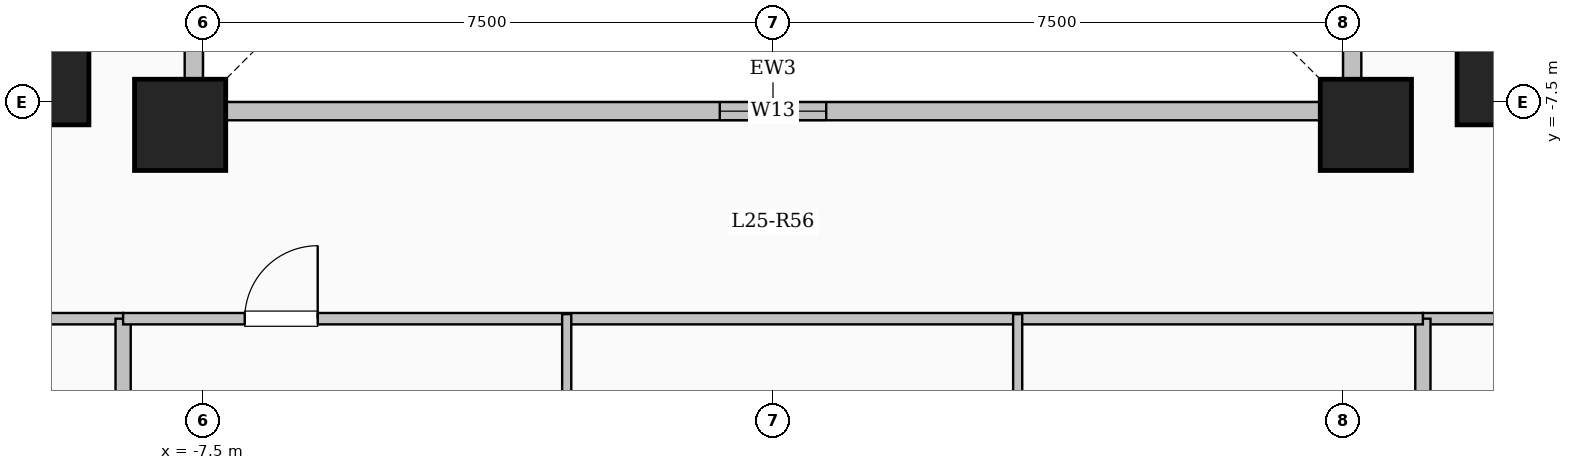
"""IFC4 building model, lengths in metres.
Left out: names, types, materials, properties, quantities, classifications, styles, units other than length and angle.
Written with IfcOpenShell. Run it as: python <this file> out.ifc"""

import sys

from ifc_helpers import new_model, si_unit, direction, frame, frame_2d, origin, origin_2d, place, context, subcontext, project, spatial, rectangle, extrude, element, fill, save


model = new_model("IFC4")
c1 = context("Model", 3, precision=1e-05, world=origin(), true_north=direction((0.0, 1.0)))
c2 = subcontext(c1, "Body", "Model", "MODEL_VIEW")
j1 = project(units=[si_unit("LENGTHUNIT", "METRE"), si_unit("PLANEANGLEUNIT", "RADIAN")], contexts=[c1])
p1 = place(None, origin())
s1 = spatial("IfcSite", under=j1, at=p1, CompositionType="ELEMENT")
p2 = place(p1, origin())
s2 = spatial("IfcBuilding", under=s1, at=p2, CompositionType="ELEMENT")
p3 = place(p2, frame((0.0, 0.0, 95.05)))
s3 = spatial("IfcBuildingStorey", under=s2, at=p3, CompositionType="ELEMENT", Elevation=95.05)
for number, where, z_axis, x_axis in (
    (1, (-7.8, -7.8, 0.0), (0.0, 0.0, 1.0), (1.0, 0.0, 0.0)),
    (2, (7.8, -7.8, 0.0), (0.0, 0.0, 1.0), (1.0, 0.0, 0.0)),
    (3, (-9.6, -7.2, 0.0), (0.0, 0.0, 1.0), (1.0, 0.0, 0.0)),
    (4, (9.6, -7.2, 0.0), (0.0, 0.0, 1.0), (1.0, 0.0, 0.0)),
):
    element("IfcColumn", number, at=place(p3, frame(where, z_axis=z_axis, x_axis=x_axis)), inside=s3, PredefinedType="COLUMN", context=c2, shape_type="SweptSolid", body=[
        extrude(rectangle(XDim=1.2, YDim=1.2, at=origin_2d()), origin(), (0.0, 0.0, 1.0), 3.35),
    ])
p4 = place(p3, frame((-7.62, -7.62, 0.0), z_axis=(0.0, 0.0, 1.0), x_axis=(1.0, 0.0, 0.0)))
e5 = element("IfcWall", 5, at=p4, inside=s3, PredefinedType="SOLIDWALL", context=c2, shape_type="SweptSolid", body=[
    extrude(rectangle(XDim=15.24, YDim=0.24, at=frame_2d((7.62, 0.0))), origin(), (0.0, 0.0, 1.0), 3.1),
])
p5 = place(p4, frame((6.92, 0.0, 0.95)))
e6 = element("IfcOpeningElement", 6, at=p5, cuts=e5, PredefinedType="OPENING", context=c2, shape_type="SweptSolid", body=[
    extrude(rectangle(XDim=1.4, YDim=1.5, at=frame_2d((0.7, 0.75))), frame((0.0, 0.13, 0.0), z_axis=(0.0, -1.0, 0.0), x_axis=(1.0, 0.0, 0.0)), (0.0, 0.0, 1.0), 0.26),
])
p6 = place(p3, frame((7.62, -7.62, 0.0), z_axis=(0.0, 0.0, 1.0), x_axis=(0.0, 1.0, 0.0)))
e7 = element("IfcWall", 7, at=p6, inside=s3, PredefinedType="SOLIDWALL", context=c2, shape_type="SweptSolid", body=[
    extrude(rectangle(XDim=15.24, YDim=0.24, at=frame_2d((7.62, 0.0))), origin(), (0.0, 0.0, 1.0), 3.1),
])
p7 = place(p6, frame((6.92, 0.0, 0.95)))
e8 = element("IfcOpeningElement", 8, at=p7, cuts=e7, PredefinedType="OPENING", context=c2, shape_type="SweptSolid", body=[
    extrude(rectangle(XDim=1.4, YDim=1.5, at=frame_2d((0.7, 0.75))), frame((0.0, 0.13, 0.0), z_axis=(0.0, -1.0, 0.0), x_axis=(1.0, 0.0, 0.0)), (0.0, 0.0, 1.0), 0.26),
])
p8 = place(p3, frame((-7.62, 7.62, 0.0), z_axis=(0.0, 0.0, 1.0), x_axis=(0.0, -1.0, 0.0)))
e9 = element("IfcWall", 9, at=p8, inside=s3, PredefinedType="SOLIDWALL", context=c2, shape_type="SweptSolid", body=[
    extrude(rectangle(XDim=15.24, YDim=0.24, at=frame_2d((7.62, 0.0))), origin(), (0.0, 0.0, 1.0), 3.1),
])
p9 = place(p8, frame((6.92, 0.0, 0.95)))
e10 = element("IfcOpeningElement", 10, at=p9, cuts=e9, PredefinedType="OPENING", context=c2, shape_type="SweptSolid", body=[
    extrude(rectangle(XDim=1.4, YDim=1.5, at=frame_2d((0.7, 0.75))), frame((0.0, 0.13, 0.0), z_axis=(0.0, -1.0, 0.0), x_axis=(1.0, 0.0, 0.0)), (0.0, 0.0, 1.0), 0.26),
])
p10 = place(p3, frame((-21.05, -10.35, 0.0), z_axis=(0.0, 0.0, 1.0), x_axis=(1.0, 0.0, 0.0)))
e11 = element("IfcWall", 11, at=p10, inside=s3, PredefinedType="PARTITIONING", context=c2, shape_type="SweptSolid", body=[
    extrude(rectangle(XDim=12.5, YDim=0.15, at=frame_2d((6.25, 0.0))), origin(), (0.0, 0.0, 1.0), 3.1),
])
p11 = place(p10, frame((1.736, 0.0, 0.0)))
e12 = element("IfcOpeningElement", 12, at=p11, cuts=e11, PredefinedType="OPENING", context=c2, shape_type="SweptSolid", body=[
    extrude(rectangle(XDim=0.95, YDim=2.15, at=frame_2d((0.475, 1.075))), frame((0.0, 0.085, 0.0), z_axis=(0.0, -1.0, 0.0), x_axis=(1.0, 0.0, 0.0)), (0.0, 0.0, 1.0), 0.17),
])
p12 = place(p10, frame((6.248, 0.0, 0.0)))
e13 = element("IfcOpeningElement", 13, at=p12, cuts=e11, PredefinedType="OPENING", context=c2, shape_type="SweptSolid", body=[
    extrude(rectangle(XDim=0.95, YDim=2.15, at=frame_2d((0.475, 1.075))), frame((0.0, 0.085, 0.0), z_axis=(0.0, -1.0, 0.0), x_axis=(1.0, 0.0, 0.0)), (0.0, 0.0, 1.0), 0.17),
])
p13 = place(p10, frame((10.262, 0.0, 0.0)))
e14 = element("IfcOpeningElement", 14, at=p13, cuts=e11, PredefinedType="OPENING", context=c2, shape_type="SweptSolid", body=[
    extrude(rectangle(XDim=0.95, YDim=2.15, at=frame_2d((0.475, 1.075))), frame((0.0, 0.085, 0.0), z_axis=(0.0, -1.0, 0.0), x_axis=(1.0, 0.0, 0.0)), (0.0, 0.0, 1.0), 0.17),
])
p14 = place(p3, frame((8.55, -10.35, 0.0), z_axis=(0.0, 0.0, 1.0), x_axis=(1.0, 0.0, 0.0)))
e15 = element("IfcWall", 15, at=p14, inside=s3, PredefinedType="PARTITIONING", context=c2, shape_type="SweptSolid", body=[
    extrude(rectangle(XDim=12.5, YDim=0.15, at=frame_2d((6.25, 0.0))), origin(), (0.0, 0.0, 1.0), 3.1),
])
p15 = place(p14, frame((1.786, 0.0, 0.0)))
e16 = element("IfcOpeningElement", 16, at=p15, cuts=e15, PredefinedType="OPENING", context=c2, shape_type="SweptSolid", body=[
    extrude(rectangle(XDim=0.95, YDim=2.15, at=frame_2d((0.475, 1.075))), frame((0.0, 0.085, 0.0), z_axis=(0.0, -1.0, 0.0), x_axis=(1.0, 0.0, 0.0)), (0.0, 0.0, 1.0), 0.17),
])
p16 = place(p14, frame((6.298, 0.0, 0.0)))
e17 = element("IfcOpeningElement", 17, at=p16, cuts=e15, PredefinedType="OPENING", context=c2, shape_type="SweptSolid", body=[
    extrude(rectangle(XDim=0.95, YDim=2.15, at=frame_2d((0.475, 1.075))), frame((0.0, 0.085, 0.0), z_axis=(0.0, -1.0, 0.0), x_axis=(1.0, 0.0, 0.0)), (0.0, 0.0, 1.0), 0.17),
])
p17 = place(p14, frame((10.312, 0.0, 0.0)))
e18 = element("IfcOpeningElement", 18, at=p17, cuts=e15, PredefinedType="OPENING", context=c2, shape_type="SweptSolid", body=[
    extrude(rectangle(XDim=0.95, YDim=2.15, at=frame_2d((0.475, 1.075))), frame((0.0, 0.085, 0.0), z_axis=(0.0, -1.0, 0.0), x_axis=(1.0, 0.0, 0.0)), (0.0, 0.0, 1.0), 0.17),
])
for number, where, z_axis, x_axis in (
    (19, (-8.55, -22.704, 0.0), (0.0, 0.0, 1.0), (0.0, 1.0, 0.0)),
    (20, (8.55, -22.704, 0.0), (0.0, 0.0, 1.0), (0.0, 1.0, 0.0)),
):
    element("IfcWall", number, at=place(p3, frame(where, z_axis=z_axis, x_axis=x_axis)), inside=s3, PredefinedType="SOLIDWALL", context=c2, shape_type="SweptSolid", body=[
        extrude(rectangle(XDim=12.354, YDim=0.2, at=frame_2d((6.177, 0.0))), origin(), (0.0, 0.0, 1.0), 3.1),
    ])
p18 = place(p3, frame((-8.55, -10.35, 0.0), z_axis=(0.0, 0.0, 1.0), x_axis=(1.0, 0.0, 0.0)))
e21 = element("IfcWall", 21, at=p18, inside=s3, PredefinedType="PARTITIONING", context=c2, shape_type="SweptSolid", body=[
    extrude(rectangle(XDim=17.1, YDim=0.15, at=frame_2d((8.55, 0.0))), origin(), (0.0, 0.0, 1.0), 3.1),
])
p19 = place(p18, frame((1.6, 0.0, 0.0)))
e22 = element("IfcOpeningElement", 22, at=p19, cuts=e21, PredefinedType="OPENING", context=c2, shape_type="SweptSolid", body=[
    extrude(rectangle(XDim=0.96, YDim=2.15, at=frame_2d((0.48, 1.075))), frame((0.0, 0.085, 0.0), z_axis=(0.0, -1.0, 0.0), x_axis=(1.0, 0.0, 0.0)), (0.0, 0.0, 1.0), 0.17),
])
p20 = place(p3, frame((-2.714, -23.58, 0.0), z_axis=(0.0, 0.0, 1.0), x_axis=(0.0, 1.0, 0.0)))
e23 = element("IfcWall", 23, at=p20, inside=s3, PredefinedType="PARTITIONING", context=c2, shape_type="SweptSolid", body=[
    extrude(rectangle(XDim=13.29, YDim=0.12, at=frame_2d((6.645, 0.0))), origin(), (0.0, 0.0, 1.0), 3.1),
])
p21 = place(p20, frame((9.465, 0.0, 0.0)))
e24 = element("IfcOpeningElement", 24, at=p21, cuts=e23, PredefinedType="OPENING", context=c2, shape_type="SweptSolid", body=[
    extrude(rectangle(XDim=1.08, YDim=2.15, at=frame_2d((0.54, 1.075))), frame((0.0, 0.07, 0.0), z_axis=(0.0, -1.0, 0.0), x_axis=(1.0, 0.0, 0.0)), (0.0, 0.0, 1.0), 0.14),
])
p22 = place(p3, frame((3.219, -12.75, 0.0), z_axis=(0.0, 0.0, 1.0), x_axis=(0.0, 1.0, 0.0)))
e25 = element("IfcWall", 25, at=p22, inside=s3, PredefinedType="PARTITIONING", context=c2, shape_type="SweptSolid", body=[
    extrude(rectangle(XDim=2.46, YDim=0.12, at=frame_2d((1.23, 0.0))), origin(), (0.0, 0.0, 1.0), 3.1),
])
p23 = place(p5, origin())
e26 = element("IfcWindow", 26, at=p23, inside=s3, PartitioningType="SINGLE_PANEL", PredefinedType="WINDOW", context=c2, shape_type="SweptSolid", body=[
    extrude(rectangle(XDim=1.4, YDim=1.5, at=frame_2d((0.7, 0.75))), frame((0.0, 0.03, 0.0), z_axis=(0.0, -1.0, 0.0), x_axis=(1.0, 0.0, 0.0)), (0.0, 0.0, 1.0), 0.06),
])
fill(e6, e26)
p24 = place(p19, origin())
e27 = element("IfcDoor", 27, at=p24, inside=s3, OperationType="SINGLE_SWING_RIGHT", PredefinedType="DOOR", context=c2, shape_type="SweptSolid", body=[
    extrude(rectangle(XDim=0.96, YDim=2.15, at=frame_2d((0.48, 1.075))), frame((0.0, 0.025, 0.0), z_axis=(0.0, -1.0, 0.0), x_axis=(1.0, 0.0, 0.0)), (0.0, 0.0, 1.0), 0.05),
])
fill(e22, e27)
save(model, sys.argv[1])
